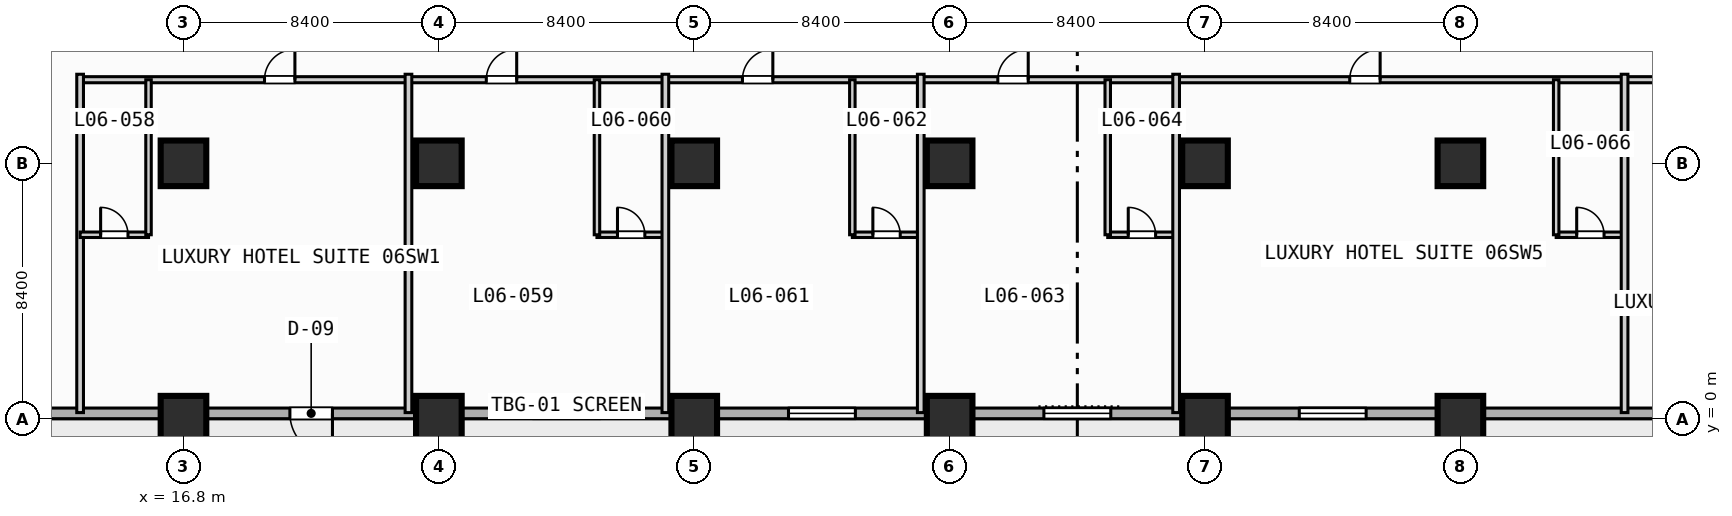
"""IFC4 building model, lengths in metres.
Left out: names, types, materials, properties, quantities, classifications, styles, units other than length and angle.
Written with IfcOpenShell. Run it as: python <this file> out.ifc"""

import sys

from ifc_helpers import new_model, si_unit, direction, frame, frame_2d, origin, origin_2d, place, context, subcontext, project, spatial, rectangle, extrude, element, fill, save


model = new_model("IFC4")
c1 = context("Model", 3, precision=1e-05, world=origin(), true_north=direction((0.0, 1.0)))
c2 = subcontext(c1, "Body", "Model", "MODEL_VIEW")
j1 = project(units=[si_unit("LENGTHUNIT", "METRE"), si_unit("PLANEANGLEUNIT", "RADIAN")], contexts=[c1])
p1 = place(None, origin())
s1 = spatial("IfcSite", under=j1, at=p1, CompositionType="ELEMENT")
p2 = place(p1, origin())
s2 = spatial("IfcBuilding", under=s1, at=p2, CompositionType="ELEMENT")
p3 = place(p2, frame((0.0, 0.0, 32.0)))
s3 = spatial("IfcBuildingStorey", under=s2, at=p3, CompositionType="ELEMENT", Elevation=32.0)
for number, where, z_axis, x_axis in (
    (1, (16.8, 0.0, 0.0), (0.0, 0.0, 1.0), (1.0, 0.0, 0.0)),
    (2, (16.8, 8.4, 0.0), (0.0, 0.0, 1.0), (1.0, 0.0, 0.0)),
    (3, (25.2, 0.0, 0.0), (0.0, 0.0, 1.0), (1.0, 0.0, 0.0)),
    (4, (25.2, 8.4, 0.0), (0.0, 0.0, 1.0), (1.0, 0.0, 0.0)),
    (5, (33.6, 0.0, 0.0), (0.0, 0.0, 1.0), (1.0, 0.0, 0.0)),
    (6, (33.6, 8.4, 0.0), (0.0, 0.0, 1.0), (1.0, 0.0, 0.0)),
    (7, (42.0, 0.0, 0.0), (0.0, 0.0, 1.0), (1.0, 0.0, 0.0)),
    (8, (42.0, 8.4, 0.0), (0.0, 0.0, 1.0), (1.0, 0.0, 0.0)),
    (9, (50.4, 0.0, 0.0), (0.0, 0.0, 1.0), (1.0, 0.0, 0.0)),
    (10, (50.4, 8.4, 0.0), (0.0, 0.0, 1.0), (1.0, 0.0, 0.0)),
    (11, (58.8, 0.0, 0.0), (0.0, 0.0, 1.0), (1.0, 0.0, 0.0)),
    (12, (58.8, 8.4, 0.0), (0.0, 0.0, 1.0), (1.0, 0.0, 0.0)),
):
    element("IfcColumn", number, at=place(p3, frame(where, z_axis=z_axis, x_axis=x_axis)), inside=s3, PredefinedType="COLUMN", context=c2, shape_type="SweptSolid", body=[
        extrude(rectangle(XDim=1.5, YDim=1.5, at=origin_2d()), origin(), (0.0, 0.0, 1.0), 3.8),
    ])
p4 = place(p3, frame((89.225, 0.175, 0.0), z_axis=(0.0, 0.0, 1.0), x_axis=(-1.0, 0.0, 0.0)))
e13 = element("IfcWall", 13, at=p4, inside=s3, PredefinedType="STANDARD", context=c2, shape_type="SweptSolid", body=[
    extrude(rectangle(XDim=86.05, YDim=0.35, at=frame_2d((43.025, 0.0))), origin(), (0.0, 0.0, 1.0), 3.55),
])
p5 = place(p4, frame((67.525, 0.0, 0.0)))
e14 = element("IfcOpeningElement", 14, at=p5, cuts=e13, PredefinedType="OPENING", context=c2, shape_type="SweptSolid", body=[
    extrude(rectangle(XDim=1.4, YDim=2.2, at=frame_2d((0.7, 1.1))), frame((0.0, 0.185, 0.0), z_axis=(0.0, -1.0, 0.0), x_axis=(1.0, 0.0, 0.0)), (0.0, 0.0, 1.0), 0.37),
])
p6 = place(p4, frame((58.725, 0.0, 0.85)))
e15 = element("IfcOpeningElement", 15, at=p6, cuts=e13, PredefinedType="OPENING", context=c2, shape_type="SweptSolid", body=[
    extrude(rectangle(XDim=2.2, YDim=1.8, at=frame_2d((1.1, 0.9))), frame((0.0, 0.185, 0.0), z_axis=(0.0, -1.0, 0.0), x_axis=(1.0, 0.0, 0.0)), (0.0, 0.0, 1.0), 0.37),
])
p7 = place(p4, frame((50.325, 0.0, 0.85)))
e16 = element("IfcOpeningElement", 16, at=p7, cuts=e13, PredefinedType="OPENING", context=c2, shape_type="SweptSolid", body=[
    extrude(rectangle(XDim=2.2, YDim=1.8, at=frame_2d((1.1, 0.9))), frame((0.0, 0.185, 0.0), z_axis=(0.0, -1.0, 0.0), x_axis=(1.0, 0.0, 0.0)), (0.0, 0.0, 1.0), 0.37),
])
p8 = place(p4, frame((41.925, 0.0, 0.85)))
e17 = element("IfcOpeningElement", 17, at=p8, cuts=e13, PredefinedType="OPENING", context=c2, shape_type="SweptSolid", body=[
    extrude(rectangle(XDim=2.2, YDim=1.8, at=frame_2d((1.1, 0.9))), frame((0.0, 0.185, 0.0), z_axis=(0.0, -1.0, 0.0), x_axis=(1.0, 0.0, 0.0)), (0.0, 0.0, 1.0), 0.37),
])
p9 = place(p4, frame((33.525, 0.0, 0.85)))
e18 = element("IfcOpeningElement", 18, at=p9, cuts=e13, PredefinedType="OPENING", context=c2, shape_type="SweptSolid", body=[
    extrude(rectangle(XDim=2.2, YDim=1.8, at=frame_2d((1.1, 0.9))), frame((0.0, 0.185, 0.0), z_axis=(0.0, -1.0, 0.0), x_axis=(1.0, 0.0, 0.0)), (0.0, 0.0, 1.0), 0.37),
])
p10 = place(p4, frame((16.725, 0.0, 0.85)))
e19 = element("IfcOpeningElement", 19, at=p10, cuts=e13, PredefinedType="OPENING", context=c2, shape_type="SweptSolid", body=[
    extrude(rectangle(XDim=2.2, YDim=1.8, at=frame_2d((1.1, 0.9))), frame((0.0, 0.185, 0.0), z_axis=(0.0, -1.0, 0.0), x_axis=(1.0, 0.0, 0.0)), (0.0, 0.0, 1.0), 0.37),
])
p11 = place(p4, frame((8.325, 0.0, 0.85)))
e20 = element("IfcOpeningElement", 20, at=p11, cuts=e13, PredefinedType="OPENING", context=c2, shape_type="SweptSolid", body=[
    extrude(rectangle(XDim=2.2, YDim=1.8, at=frame_2d((1.1, 0.9))), frame((0.0, 0.185, 0.0), z_axis=(0.0, -1.0, 0.0), x_axis=(1.0, 0.0, 0.0)), (0.0, 0.0, 1.0), 0.37),
])
p12 = place(p4, frame((2.4, 0.0, 0.85)))
e21 = element("IfcOpeningElement", 21, at=p12, cuts=e13, PredefinedType="OPENING", context=c2, shape_type="SweptSolid", body=[
    extrude(rectangle(XDim=1.8, YDim=1.8, at=frame_2d((0.9, 0.9))), frame((0.0, 0.185, 0.0), z_axis=(0.0, -1.0, 0.0), x_axis=(1.0, 0.0, 0.0)), (0.0, 0.0, 1.0), 0.37),
])
p13 = place(p3, frame((13.4, 11.15, 0.0), z_axis=(0.0, 0.0, 1.0), x_axis=(1.0, 0.0, 0.0)))
e22 = element("IfcWall", 22, at=p13, inside=s3, PredefinedType="PARTITIONING", context=c2, shape_type="SweptSolid", body=[
    extrude(rectangle(XDim=75.4, YDim=0.2, at=frame_2d((37.7, 0.0))), origin(), (0.0, 0.0, 1.0), 3.55),
])
p14 = place(p13, frame((6.065, 0.0, 0.0)))
e23 = element("IfcOpeningElement", 23, at=p14, cuts=e22, PredefinedType="OPENING", context=c2, shape_type="SweptSolid", body=[
    extrude(rectangle(XDim=1.0, YDim=2.15, at=frame_2d((0.5, 1.075))), frame((0.0, 0.11, 0.0), z_axis=(0.0, -1.0, 0.0), x_axis=(1.0, 0.0, 0.0)), (0.0, 0.0, 1.0), 0.22),
])
p15 = place(p13, frame((13.36, 0.0, 0.0)))
e24 = element("IfcOpeningElement", 24, at=p15, cuts=e22, PredefinedType="OPENING", context=c2, shape_type="SweptSolid", body=[
    extrude(rectangle(XDim=1.0, YDim=2.15, at=frame_2d((0.5, 1.075))), frame((0.0, 0.11, 0.0), z_axis=(0.0, -1.0, 0.0), x_axis=(1.0, 0.0, 0.0)), (0.0, 0.0, 1.0), 0.22),
])
p16 = place(p13, frame((21.785, 0.0, 0.0)))
e25 = element("IfcOpeningElement", 25, at=p16, cuts=e22, PredefinedType="OPENING", context=c2, shape_type="SweptSolid", body=[
    extrude(rectangle(XDim=1.0, YDim=2.15, at=frame_2d((0.5, 1.075))), frame((0.0, 0.11, 0.0), z_axis=(0.0, -1.0, 0.0), x_axis=(1.0, 0.0, 0.0)), (0.0, 0.0, 1.0), 0.22),
])
p17 = place(p13, frame((30.185, 0.0, 0.0)))
e26 = element("IfcOpeningElement", 26, at=p17, cuts=e22, PredefinedType="OPENING", context=c2, shape_type="SweptSolid", body=[
    extrude(rectangle(XDim=1.0, YDim=2.15, at=frame_2d((0.5, 1.075))), frame((0.0, 0.11, 0.0), z_axis=(0.0, -1.0, 0.0), x_axis=(1.0, 0.0, 0.0)), (0.0, 0.0, 1.0), 0.22),
])
p18 = place(p13, frame((41.76, 0.0, 0.0)))
e27 = element("IfcOpeningElement", 27, at=p18, cuts=e22, PredefinedType="OPENING", context=c2, shape_type="SweptSolid", body=[
    extrude(rectangle(XDim=1.0, YDim=2.15, at=frame_2d((0.5, 1.075))), frame((0.0, 0.11, 0.0), z_axis=(0.0, -1.0, 0.0), x_axis=(1.0, 0.0, 0.0)), (0.0, 0.0, 1.0), 0.22),
])
p19 = place(p13, frame((54.36, 0.0, 0.0)))
e28 = element("IfcOpeningElement", 28, at=p19, cuts=e22, PredefinedType="OPENING", context=c2, shape_type="SweptSolid", body=[
    extrude(rectangle(XDim=1.0, YDim=2.15, at=frame_2d((0.5, 1.075))), frame((0.0, 0.11, 0.0), z_axis=(0.0, -1.0, 0.0), x_axis=(1.0, 0.0, 0.0)), (0.0, 0.0, 1.0), 0.22),
])
p20 = place(p13, frame((63.785, 0.0, 0.0)))
e29 = element("IfcOpeningElement", 29, at=p20, cuts=e22, PredefinedType="OPENING", context=c2, shape_type="SweptSolid", body=[
    extrude(rectangle(XDim=1.0, YDim=2.15, at=frame_2d((0.5, 1.075))), frame((0.0, 0.11, 0.0), z_axis=(0.0, -1.0, 0.0), x_axis=(1.0, 0.0, 0.0)), (0.0, 0.0, 1.0), 0.22),
])
p21 = place(p13, frame((70.86, 0.0, 0.0)))
e30 = element("IfcOpeningElement", 30, at=p21, cuts=e22, PredefinedType="OPENING", context=c2, shape_type="SweptSolid", body=[
    extrude(rectangle(XDim=1.0, YDim=2.15, at=frame_2d((0.5, 1.075))), frame((0.0, 0.11, 0.0), z_axis=(0.0, -1.0, 0.0), x_axis=(1.0, 0.0, 0.0)), (0.0, 0.0, 1.0), 0.22),
])
p22 = place(p3, frame((13.4, 0.2, 0.0), z_axis=(0.0, 0.0, 1.0), x_axis=(0.0, 1.0, 0.0)))
e31 = element("IfcWall", 31, at=p22, inside=s3, PredefinedType="PARTITIONING", context=c2, shape_type="SweptSolid", body=[
    extrude(rectangle(XDim=11.13, YDim=0.22, at=frame_2d((5.565, 0.0))), origin(), (0.0, 0.0, 1.0), 3.55),
])
p23 = place(p3, frame((13.4, 6.05, 0.0), z_axis=(0.0, 0.0, 1.0), x_axis=(1.0, 0.0, 0.0)))
e32 = element("IfcWall", 32, at=p23, inside=s3, PredefinedType="PLUMBINGWALL", context=c2, shape_type="SweptSolid", body=[
    extrude(rectangle(XDim=2.25, YDim=0.18, at=frame_2d((1.125, 0.0))), origin(), (0.0, 0.0, 1.0), 3.55),
])
p24 = place(p23, frame((0.675, 0.0, 0.0)))
e33 = element("IfcOpeningElement", 33, at=p24, cuts=e32, PredefinedType="OPENING", context=c2, shape_type="SweptSolid", body=[
    extrude(rectangle(XDim=0.9, YDim=2.1, at=frame_2d((0.45, 1.05))), frame((0.0, 0.1, 0.0), z_axis=(0.0, -1.0, 0.0), x_axis=(1.0, 0.0, 0.0)), (0.0, 0.0, 1.0), 0.2),
])
p25 = place(p3, frame((15.65, 6.05, 0.0), z_axis=(0.0, 0.0, 1.0), x_axis=(0.0, 1.0, 0.0)))
e34 = element("IfcWall", 34, at=p25, inside=s3, PredefinedType="PLUMBINGWALL", context=c2, shape_type="SweptSolid", body=[
    extrude(rectangle(XDim=5.1, YDim=0.18, at=frame_2d((2.55, 0.0))), origin(), (0.0, 0.0, 1.0), 3.55),
])
p26 = place(p3, frame((24.2, 0.2, 0.0), z_axis=(0.0, 0.0, 1.0), x_axis=(0.0, 1.0, 0.0)))
e35 = element("IfcWall", 35, at=p26, inside=s3, PredefinedType="PARTITIONING", context=c2, shape_type="SweptSolid", body=[
    extrude(rectangle(XDim=11.13, YDim=0.22, at=frame_2d((5.565, 0.0))), origin(), (0.0, 0.0, 1.0), 3.55),
])
p27 = place(p3, frame((30.4, 6.05, 0.0), z_axis=(0.0, 0.0, 1.0), x_axis=(1.0, 0.0, 0.0)))
e36 = element("IfcWall", 36, at=p27, inside=s3, PredefinedType="PLUMBINGWALL", context=c2, shape_type="SweptSolid", body=[
    extrude(rectangle(XDim=2.25, YDim=0.18, at=frame_2d((1.125, 0.0))), origin(), (0.0, 0.0, 1.0), 3.55),
])
p28 = place(p27, frame((0.675, 0.0, 0.0)))
e37 = element("IfcOpeningElement", 37, at=p28, cuts=e36, PredefinedType="OPENING", context=c2, shape_type="SweptSolid", body=[
    extrude(rectangle(XDim=0.9, YDim=2.1, at=frame_2d((0.45, 1.05))), frame((0.0, 0.1, 0.0), z_axis=(0.0, -1.0, 0.0), x_axis=(1.0, 0.0, 0.0)), (0.0, 0.0, 1.0), 0.2),
])
p29 = place(p3, frame((30.4, 6.05, 0.0), z_axis=(0.0, 0.0, 1.0), x_axis=(0.0, 1.0, 0.0)))
e38 = element("IfcWall", 38, at=p29, inside=s3, PredefinedType="PLUMBINGWALL", context=c2, shape_type="SweptSolid", body=[
    extrude(rectangle(XDim=5.1, YDim=0.18, at=frame_2d((2.55, 0.0))), origin(), (0.0, 0.0, 1.0), 3.55),
])
p30 = place(p3, frame((32.65, 0.2, 0.0), z_axis=(0.0, 0.0, 1.0), x_axis=(0.0, 1.0, 0.0)))
e39 = element("IfcWall", 39, at=p30, inside=s3, PredefinedType="PARTITIONING", context=c2, shape_type="SweptSolid", body=[
    extrude(rectangle(XDim=11.13, YDim=0.22, at=frame_2d((5.565, 0.0))), origin(), (0.0, 0.0, 1.0), 3.55),
])
p31 = place(p3, frame((38.8, 6.05, 0.0), z_axis=(0.0, 0.0, 1.0), x_axis=(1.0, 0.0, 0.0)))
e40 = element("IfcWall", 40, at=p31, inside=s3, PredefinedType="PLUMBINGWALL", context=c2, shape_type="SweptSolid", body=[
    extrude(rectangle(XDim=2.25, YDim=0.18, at=frame_2d((1.125, 0.0))), origin(), (0.0, 0.0, 1.0), 3.55),
])
p32 = place(p31, frame((0.675, 0.0, 0.0)))
e41 = element("IfcOpeningElement", 41, at=p32, cuts=e40, PredefinedType="OPENING", context=c2, shape_type="SweptSolid", body=[
    extrude(rectangle(XDim=0.9, YDim=2.1, at=frame_2d((0.45, 1.05))), frame((0.0, 0.1, 0.0), z_axis=(0.0, -1.0, 0.0), x_axis=(1.0, 0.0, 0.0)), (0.0, 0.0, 1.0), 0.2),
])
p33 = place(p3, frame((38.8, 6.05, 0.0), z_axis=(0.0, 0.0, 1.0), x_axis=(0.0, 1.0, 0.0)))
e42 = element("IfcWall", 42, at=p33, inside=s3, PredefinedType="PLUMBINGWALL", context=c2, shape_type="SweptSolid", body=[
    extrude(rectangle(XDim=5.1, YDim=0.18, at=frame_2d((2.55, 0.0))), origin(), (0.0, 0.0, 1.0), 3.55),
])
p34 = place(p3, frame((41.05, 0.2, 0.0), z_axis=(0.0, 0.0, 1.0), x_axis=(0.0, 1.0, 0.0)))
e43 = element("IfcWall", 43, at=p34, inside=s3, PredefinedType="PARTITIONING", context=c2, shape_type="SweptSolid", body=[
    extrude(rectangle(XDim=11.13, YDim=0.22, at=frame_2d((5.565, 0.0))), origin(), (0.0, 0.0, 1.0), 3.55),
])
p35 = place(p3, frame((47.2, 6.05, 0.0), z_axis=(0.0, 0.0, 1.0), x_axis=(1.0, 0.0, 0.0)))
e44 = element("IfcWall", 44, at=p35, inside=s3, PredefinedType="PLUMBINGWALL", context=c2, shape_type="SweptSolid", body=[
    extrude(rectangle(XDim=2.25, YDim=0.18, at=frame_2d((1.125, 0.0))), origin(), (0.0, 0.0, 1.0), 3.55),
])
p36 = place(p35, frame((0.675, 0.0, 0.0)))
e45 = element("IfcOpeningElement", 45, at=p36, cuts=e44, PredefinedType="OPENING", context=c2, shape_type="SweptSolid", body=[
    extrude(rectangle(XDim=0.9, YDim=2.1, at=frame_2d((0.45, 1.05))), frame((0.0, 0.1, 0.0), z_axis=(0.0, -1.0, 0.0), x_axis=(1.0, 0.0, 0.0)), (0.0, 0.0, 1.0), 0.2),
])
p37 = place(p3, frame((47.2, 6.05, 0.0), z_axis=(0.0, 0.0, 1.0), x_axis=(0.0, 1.0, 0.0)))
e46 = element("IfcWall", 46, at=p37, inside=s3, PredefinedType="PLUMBINGWALL", context=c2, shape_type="SweptSolid", body=[
    extrude(rectangle(XDim=5.1, YDim=0.18, at=frame_2d((2.55, 0.0))), origin(), (0.0, 0.0, 1.0), 3.55),
])
p38 = place(p3, frame((49.45, 0.2, 0.0), z_axis=(0.0, 0.0, 1.0), x_axis=(0.0, 1.0, 0.0)))
e47 = element("IfcWall", 47, at=p38, inside=s3, PredefinedType="PARTITIONING", context=c2, shape_type="SweptSolid", body=[
    extrude(rectangle(XDim=11.13, YDim=0.22, at=frame_2d((5.565, 0.0))), origin(), (0.0, 0.0, 1.0), 3.55),
])
p39 = place(p3, frame((61.95, 6.05, 0.0), z_axis=(0.0, 0.0, 1.0), x_axis=(1.0, 0.0, 0.0)))
e48 = element("IfcWall", 48, at=p39, inside=s3, PredefinedType="PLUMBINGWALL", context=c2, shape_type="SweptSolid", body=[
    extrude(rectangle(XDim=2.25, YDim=0.18, at=frame_2d((1.125, 0.0))), origin(), (0.0, 0.0, 1.0), 3.55),
])
p40 = place(p39, frame((0.675, 0.0, 0.0)))
e49 = element("IfcOpeningElement", 49, at=p40, cuts=e48, PredefinedType="OPENING", context=c2, shape_type="SweptSolid", body=[
    extrude(rectangle(XDim=0.9, YDim=2.1, at=frame_2d((0.45, 1.05))), frame((0.0, 0.1, 0.0), z_axis=(0.0, -1.0, 0.0), x_axis=(1.0, 0.0, 0.0)), (0.0, 0.0, 1.0), 0.2),
])
p41 = place(p3, frame((61.95, 6.05, 0.0), z_axis=(0.0, 0.0, 1.0), x_axis=(0.0, 1.0, 0.0)))
e50 = element("IfcWall", 50, at=p41, inside=s3, PredefinedType="PLUMBINGWALL", context=c2, shape_type="SweptSolid", body=[
    extrude(rectangle(XDim=5.1, YDim=0.18, at=frame_2d((2.55, 0.0))), origin(), (0.0, 0.0, 1.0), 3.55),
])
p42 = place(p3, frame((64.2, 0.2, 0.0), z_axis=(0.0, 0.0, 1.0), x_axis=(0.0, 1.0, 0.0)))
e51 = element("IfcWall", 51, at=p42, inside=s3, PredefinedType="PARTITIONING", context=c2, shape_type="SweptSolid", body=[
    extrude(rectangle(XDim=11.13, YDim=0.22, at=frame_2d((5.565, 0.0))), origin(), (0.0, 0.0, 1.0), 3.55),
])
p43 = place(p5, origin())
e52 = element("IfcDoor", 52, at=p43, inside=s3, OperationType="SINGLE_SWING_LEFT", PredefinedType="DOOR", context=c2, shape_type="SweptSolid", body=[
    extrude(rectangle(XDim=1.4, YDim=2.2, at=frame_2d((0.7, 1.1))), frame((0.0, 0.025, 0.0), z_axis=(0.0, -1.0, 0.0), x_axis=(1.0, 0.0, 0.0)), (0.0, 0.0, 1.0), 0.05),
])
fill(e14, e52)
p44 = place(p6, origin())
e53 = element("IfcWindow", 53, at=p44, inside=s3, PartitioningType="SINGLE_PANEL", PredefinedType="WINDOW", context=c2, shape_type="SweptSolid", body=[
    extrude(rectangle(XDim=2.2, YDim=1.8, at=frame_2d((1.1, 0.9))), frame((0.0, 0.03, 0.0), z_axis=(0.0, -1.0, 0.0), x_axis=(1.0, 0.0, 0.0)), (0.0, 0.0, 1.0), 0.06),
])
fill(e15, e53)
p45 = place(p7, origin())
e54 = element("IfcWindow", 54, at=p45, inside=s3, PartitioningType="SINGLE_PANEL", PredefinedType="WINDOW", context=c2, shape_type="SweptSolid", body=[
    extrude(rectangle(XDim=2.2, YDim=1.8, at=frame_2d((1.1, 0.9))), frame((0.0, 0.03, 0.0), z_axis=(0.0, -1.0, 0.0), x_axis=(1.0, 0.0, 0.0)), (0.0, 0.0, 1.0), 0.06),
])
fill(e16, e54)
p46 = place(p8, origin())
e55 = element("IfcWindow", 55, at=p46, inside=s3, PartitioningType="SINGLE_PANEL", PredefinedType="WINDOW", context=c2, shape_type="SweptSolid", body=[
    extrude(rectangle(XDim=2.2, YDim=1.8, at=frame_2d((1.1, 0.9))), frame((0.0, 0.03, 0.0), z_axis=(0.0, -1.0, 0.0), x_axis=(1.0, 0.0, 0.0)), (0.0, 0.0, 1.0), 0.06),
])
fill(e17, e55)
p47 = place(p9, origin())
e56 = element("IfcWindow", 56, at=p47, inside=s3, PartitioningType="SINGLE_PANEL", PredefinedType="WINDOW", context=c2, shape_type="SweptSolid", body=[
    extrude(rectangle(XDim=2.2, YDim=1.8, at=frame_2d((1.1, 0.9))), frame((0.0, 0.03, 0.0), z_axis=(0.0, -1.0, 0.0), x_axis=(1.0, 0.0, 0.0)), (0.0, 0.0, 1.0), 0.06),
])
fill(e18, e56)
p48 = place(p14, origin())
e57 = element("IfcDoor", 57, at=p48, inside=s3, OperationType="SINGLE_SWING_RIGHT", PredefinedType="DOOR", context=c2, shape_type="SweptSolid", body=[
    extrude(rectangle(XDim=1.0, YDim=2.15, at=frame_2d((0.5, 1.075))), frame((0.0, 0.025, 0.0), z_axis=(0.0, -1.0, 0.0), x_axis=(1.0, 0.0, 0.0)), (0.0, 0.0, 1.0), 0.05),
])
fill(e23, e57)
p49 = place(p15, origin())
e58 = element("IfcDoor", 58, at=p49, inside=s3, OperationType="SINGLE_SWING_RIGHT", PredefinedType="DOOR", context=c2, shape_type="SweptSolid", body=[
    extrude(rectangle(XDim=1.0, YDim=2.15, at=frame_2d((0.5, 1.075))), frame((0.0, 0.025, 0.0), z_axis=(0.0, -1.0, 0.0), x_axis=(1.0, 0.0, 0.0)), (0.0, 0.0, 1.0), 0.05),
])
fill(e24, e58)
p50 = place(p16, origin())
e59 = element("IfcDoor", 59, at=p50, inside=s3, OperationType="SINGLE_SWING_RIGHT", PredefinedType="DOOR", context=c2, shape_type="SweptSolid", body=[
    extrude(rectangle(XDim=1.0, YDim=2.15, at=frame_2d((0.5, 1.075))), frame((0.0, 0.025, 0.0), z_axis=(0.0, -1.0, 0.0), x_axis=(1.0, 0.0, 0.0)), (0.0, 0.0, 1.0), 0.05),
])
fill(e25, e59)
p51 = place(p17, origin())
e60 = element("IfcDoor", 60, at=p51, inside=s3, OperationType="SINGLE_SWING_RIGHT", PredefinedType="DOOR", context=c2, shape_type="SweptSolid", body=[
    extrude(rectangle(XDim=1.0, YDim=2.15, at=frame_2d((0.5, 1.075))), frame((0.0, 0.025, 0.0), z_axis=(0.0, -1.0, 0.0), x_axis=(1.0, 0.0, 0.0)), (0.0, 0.0, 1.0), 0.05),
])
fill(e26, e60)
p52 = place(p18, origin())
e61 = element("IfcDoor", 61, at=p52, inside=s3, OperationType="SINGLE_SWING_RIGHT", PredefinedType="DOOR", context=c2, shape_type="SweptSolid", body=[
    extrude(rectangle(XDim=1.0, YDim=2.15, at=frame_2d((0.5, 1.075))), frame((0.0, 0.025, 0.0), z_axis=(0.0, -1.0, 0.0), x_axis=(1.0, 0.0, 0.0)), (0.0, 0.0, 1.0), 0.05),
])
fill(e27, e61)
p53 = place(p24, origin())
e62 = element("IfcDoor", 62, at=p53, inside=s3, OperationType="SINGLE_SWING_LEFT", PredefinedType="DOOR", context=c2, shape_type="SweptSolid", body=[
    extrude(rectangle(XDim=0.9, YDim=2.1, at=frame_2d((0.45, 1.05))), frame((0.0, 0.025, 0.0), z_axis=(0.0, -1.0, 0.0), x_axis=(1.0, 0.0, 0.0)), (0.0, 0.0, 1.0), 0.05),
])
fill(e33, e62)
p54 = place(p28, origin())
e63 = element("IfcDoor", 63, at=p54, inside=s3, OperationType="SINGLE_SWING_LEFT", PredefinedType="DOOR", context=c2, shape_type="SweptSolid", body=[
    extrude(rectangle(XDim=0.9, YDim=2.1, at=frame_2d((0.45, 1.05))), frame((0.0, 0.025, 0.0), z_axis=(0.0, -1.0, 0.0), x_axis=(1.0, 0.0, 0.0)), (0.0, 0.0, 1.0), 0.05),
])
fill(e37, e63)
p55 = place(p32, origin())
e64 = element("IfcDoor", 64, at=p55, inside=s3, OperationType="SINGLE_SWING_LEFT", PredefinedType="DOOR", context=c2, shape_type="SweptSolid", body=[
    extrude(rectangle(XDim=0.9, YDim=2.1, at=frame_2d((0.45, 1.05))), frame((0.0, 0.025, 0.0), z_axis=(0.0, -1.0, 0.0), x_axis=(1.0, 0.0, 0.0)), (0.0, 0.0, 1.0), 0.05),
])
fill(e41, e64)
p56 = place(p36, origin())
e65 = element("IfcDoor", 65, at=p56, inside=s3, OperationType="SINGLE_SWING_LEFT", PredefinedType="DOOR", context=c2, shape_type="SweptSolid", body=[
    extrude(rectangle(XDim=0.9, YDim=2.1, at=frame_2d((0.45, 1.05))), frame((0.0, 0.025, 0.0), z_axis=(0.0, -1.0, 0.0), x_axis=(1.0, 0.0, 0.0)), (0.0, 0.0, 1.0), 0.05),
])
fill(e45, e65)
p57 = place(p40, origin())
e66 = element("IfcDoor", 66, at=p57, inside=s3, OperationType="SINGLE_SWING_LEFT", PredefinedType="DOOR", context=c2, shape_type="SweptSolid", body=[
    extrude(rectangle(XDim=0.9, YDim=2.1, at=frame_2d((0.45, 1.05))), frame((0.0, 0.025, 0.0), z_axis=(0.0, -1.0, 0.0), x_axis=(1.0, 0.0, 0.0)), (0.0, 0.0, 1.0), 0.05),
])
fill(e49, e66)
save(model, sys.argv[1])
